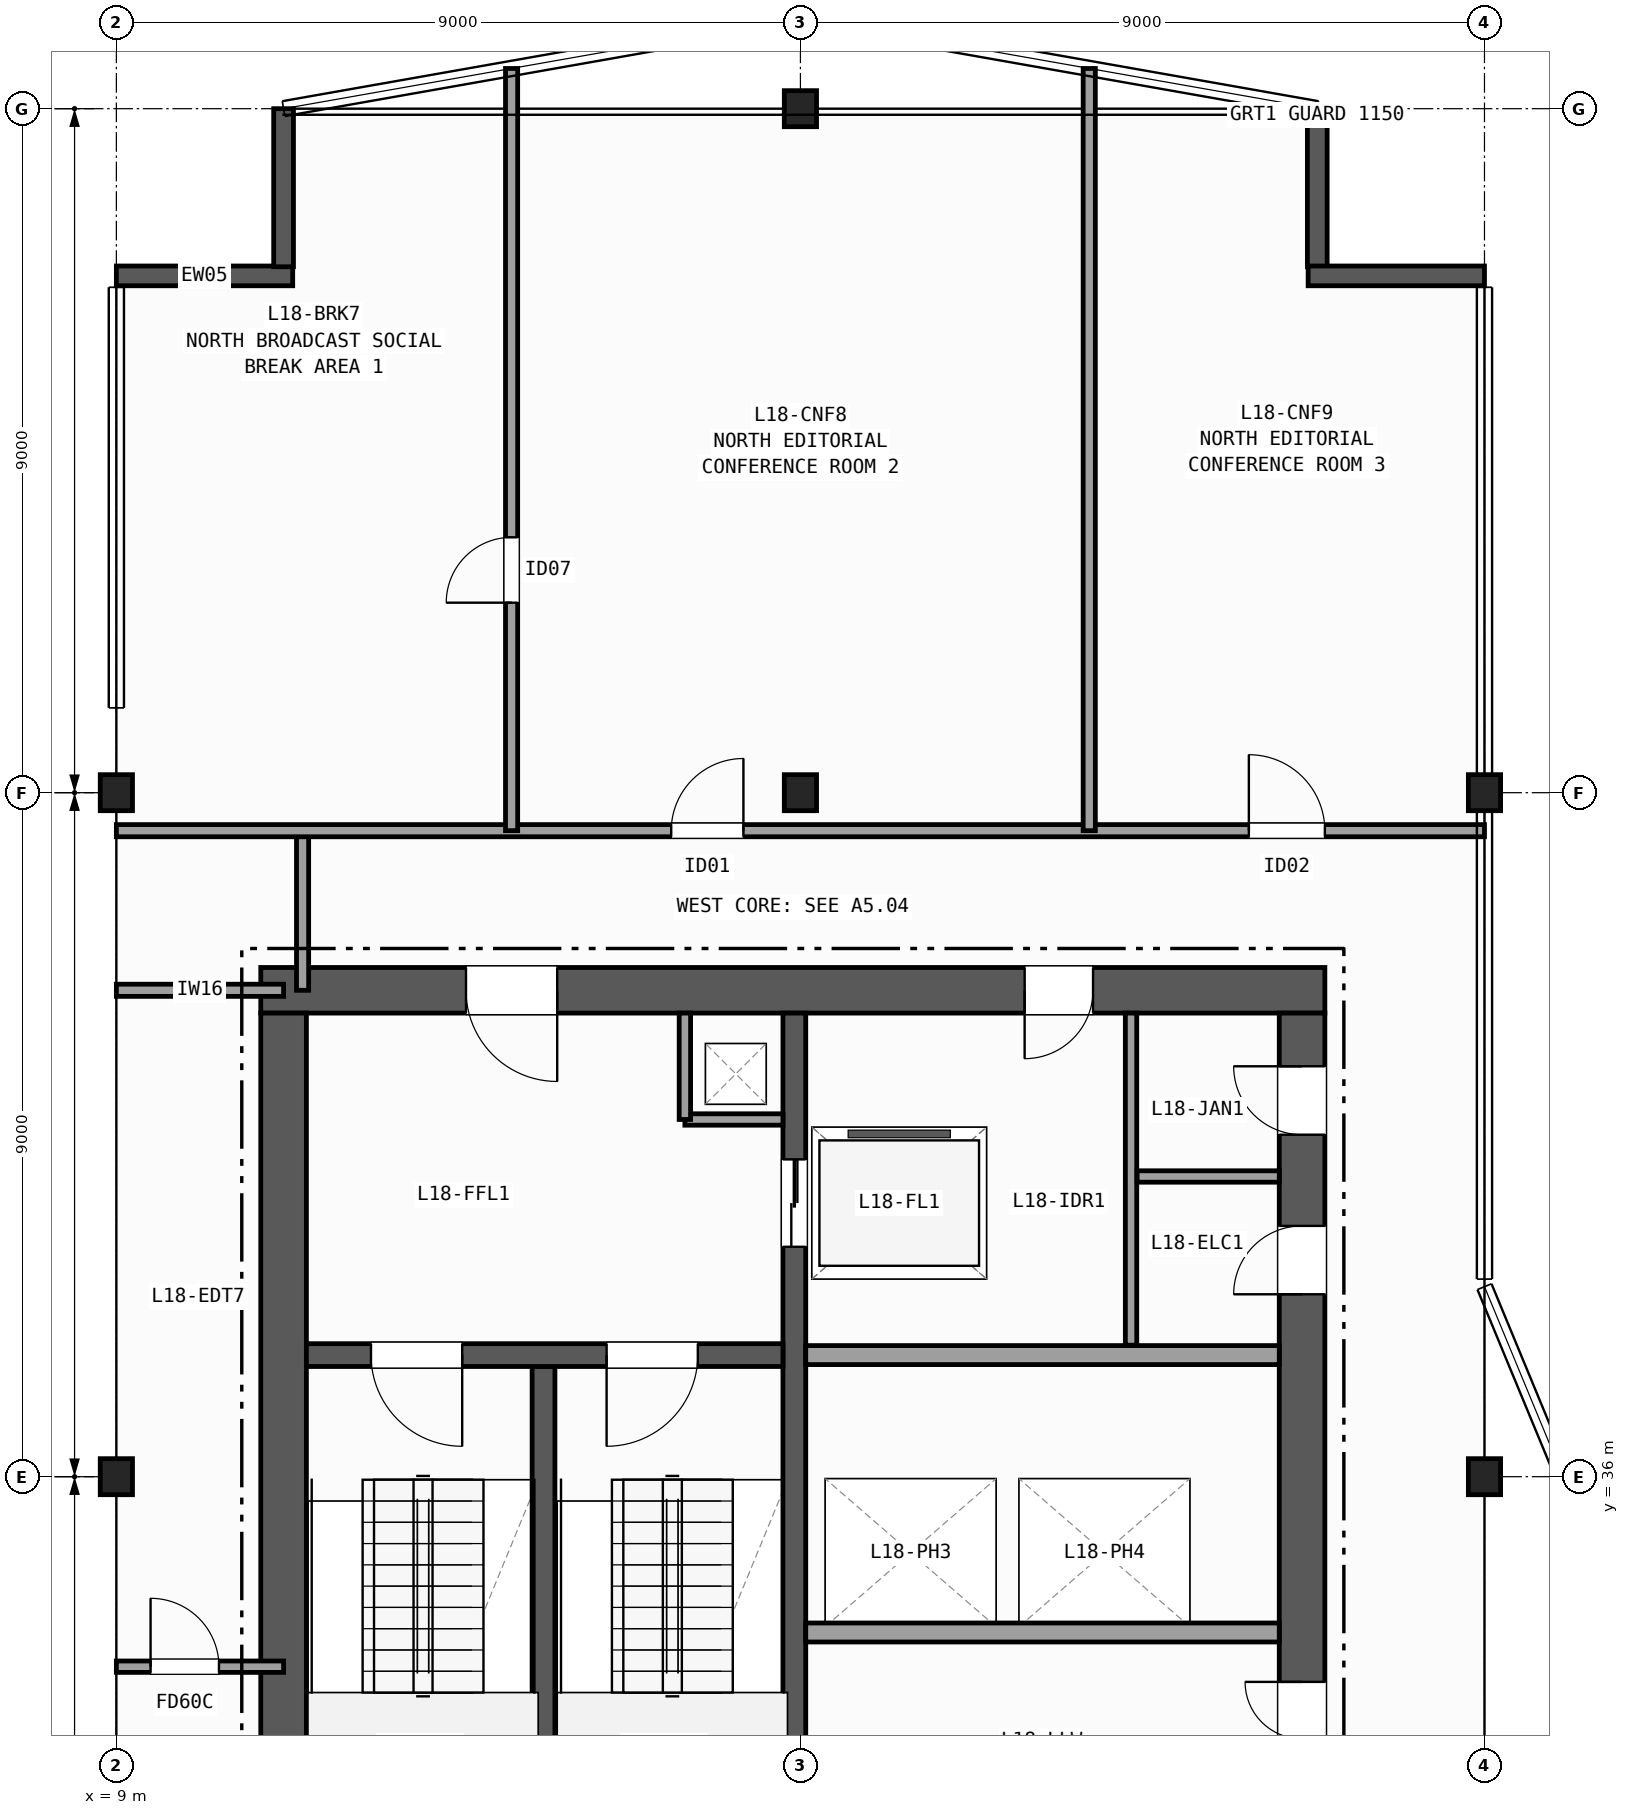
"""IFC4 building model, lengths in metres.
Left out: names, types, materials, properties, quantities, classifications, styles, units other than length and angle.
Written with IfcOpenShell. Run it as: python <this file> out.ifc"""

import sys

from ifc_helpers import new_model, si_unit, direction, frame, frame_2d, origin, origin_2d, place, context, subcontext, project, spatial, rectangle, i_section, extrude, element, fill, save


model = new_model("IFC4")
c1 = context("Model", 3, precision=1e-05, world=origin(), true_north=direction((0.0, 1.0)))
c2 = subcontext(c1, "Body", "Model", "MODEL_VIEW")
j1 = project(units=[si_unit("LENGTHUNIT", "METRE"), si_unit("PLANEANGLEUNIT", "RADIAN")], contexts=[c1])
p1 = place(None, origin())
s1 = spatial("IfcSite", under=j1, at=p1, CompositionType="ELEMENT")
p2 = place(p1, origin())
s2 = spatial("IfcBuilding", under=s1, at=p2, CompositionType="ELEMENT")
p3 = place(p2, frame((0.0, 0.0, 76.7)))
s3 = spatial("IfcBuildingStorey", under=s2, at=p3, CompositionType="ELEMENT", Elevation=76.7)
for number, where, z_axis, x_axis in (
    (1, (9.0, 36.0, 0.0), (0.0, 0.0, 1.0), (1.0, 0.0, 0.0)),
    (2, (9.0, 45.0, 0.0), (0.0, 0.0, 1.0), (1.0, 0.0, 0.0)),
    (3, (18.0, 45.0, 0.0), (0.0, 0.0, 1.0), (1.0, 0.0, 0.0)),
    (4, (18.0, 54.0, 0.0), (0.0, 0.0, 1.0), (1.0, 0.0, 0.0)),
    (5, (27.0, 36.0, 0.0), (0.0, 0.0, 1.0), (1.0, 0.0, 0.0)),
    (6, (27.0, 45.0, 0.0), (0.0, 0.0, 1.0), (1.0, 0.0, 0.0)),
):
    element("IfcColumn", number, at=place(p3, frame(where, z_axis=z_axis, x_axis=x_axis)), inside=s3, PredefinedType="COLUMN", context=c2, shape_type="SweptSolid", body=[
        extrude(i_section(OverallWidth=0.424, OverallDepth=0.474, WebThickness=0.048, FlangeThickness=0.077, FilletRadius=0.015, at=origin_2d()), origin(), (0.0, 0.0, 1.0), 3.7),
    ])
p4 = place(p3, frame((9.0, 51.8, 0.0), z_axis=(0.0, 0.0, 1.0), x_axis=(1.0, 0.0, 0.0)))
e7 = element("IfcWall", 7, at=p4, inside=s3, PredefinedType="SOLIDWALL", context=c2, shape_type="SweptSolid", body=[
    extrude(rectangle(XDim=2.32, YDim=0.26, at=frame_2d((1.16, 0.0))), origin(), (0.0, 0.0, 1.0), 3.42),
])
for number, where, z_axis, x_axis in (
    (8, (11.2, 51.92, 0.0), (0.0, 0.0, 1.0), (0.0, 1.0, 0.0)),
    (9, (24.8, 54.0, 0.0), (0.0, 0.0, 1.0), (0.0, -1.0, 0.0)),
):
    element("IfcWall", number, at=place(p3, frame(where, z_axis=z_axis, x_axis=x_axis)), inside=s3, PredefinedType="SOLIDWALL", context=c2, shape_type="SweptSolid", body=[
        extrude(rectangle(XDim=2.08, YDim=0.26, at=frame_2d((1.04, 0.0))), origin(), (0.0, 0.0, 1.0), 3.42),
    ])
p5 = place(p3, frame((24.68, 51.8, 0.0), z_axis=(0.0, 0.0, 1.0), x_axis=(1.0, 0.0, 0.0)))
e10 = element("IfcWall", 10, at=p5, inside=s3, PredefinedType="SOLIDWALL", context=c2, shape_type="SweptSolid", body=[
    extrude(rectangle(XDim=2.32, YDim=0.26, at=frame_2d((1.16, 0.0))), origin(), (0.0, 0.0, 1.0), 3.42),
])
p6 = place(p3, frame((24.9, 42.4, 0.0), z_axis=(0.0, 0.0, 1.0), x_axis=(-1.0, 0.0, 0.0)))
e11 = element("IfcWall", 11, at=p6, inside=s3, PredefinedType="SHEAR", context=c2, shape_type="SweptSolid", body=[
    extrude(rectangle(XDim=14.0, YDim=0.6, at=frame_2d((7.0, 0.0))), origin(), (0.0, 0.0, 1.0), 3.42),
])
p7 = place(p6, frame((10.1, 0.0, 0.0)))
e12 = element("IfcOpeningElement", 12, at=p7, cuts=e11, PredefinedType="OPENING", context=c2, shape_type="SweptSolid", body=[
    extrude(rectangle(XDim=1.2, YDim=2.15, at=frame_2d((0.6, 1.075))), frame((0.0, 0.31, 0.0), z_axis=(0.0, -1.0, 0.0), x_axis=(1.0, 0.0, 0.0)), (0.0, 0.0, 1.0), 0.62),
])
p8 = place(p6, frame((3.05, 0.0, 0.0)))
e13 = element("IfcOpeningElement", 13, at=p8, cuts=e11, PredefinedType="OPENING", context=c2, shape_type="SweptSolid", body=[
    extrude(rectangle(XDim=0.9, YDim=2.1, at=frame_2d((0.45, 1.05))), frame((0.0, 0.31, 0.0), z_axis=(0.0, -1.0, 0.0), x_axis=(1.0, 0.0, 0.0)), (0.0, 0.0, 1.0), 0.62),
])
p9 = place(p3, frame((11.2, 42.1, 0.0), z_axis=(0.0, 0.0, 1.0), x_axis=(0.0, -1.0, 0.0)))
e14 = element("IfcWall", 14, at=p9, inside=s3, PredefinedType="SHEAR", context=c2, shape_type="SweptSolid", body=[
    extrude(rectangle(XDim=13.6, YDim=0.6, at=frame_2d((6.8, 0.0))), origin(), (0.0, 0.0, 1.0), 3.42),
])
p10 = place(p3, frame((24.6, 28.5, 0.0), z_axis=(0.0, 0.0, 1.0), x_axis=(0.0, 1.0, 0.0)))
e15 = element("IfcWall", 15, at=p10, inside=s3, PredefinedType="SHEAR", context=c2, shape_type="SweptSolid", body=[
    extrude(rectangle(XDim=13.6, YDim=0.6, at=frame_2d((6.8, 0.0))), origin(), (0.0, 0.0, 1.0), 3.42),
])
p11 = place(p10, frame((3.3, 0.0, 0.0)))
e16 = element("IfcOpeningElement", 16, at=p11, cuts=e15, PredefinedType="OPENING", context=c2, shape_type="SweptSolid", body=[
    extrude(rectangle(XDim=1.5, YDim=2.2, at=frame_2d((0.75, 1.1))), frame((0.0, 0.31, 0.0), z_axis=(0.0, -1.0, 0.0), x_axis=(1.0, 0.0, 0.0)), (0.0, 0.0, 1.0), 0.62),
])
p12 = place(p10, frame((9.9, 0.0, 0.0)))
e17 = element("IfcOpeningElement", 17, at=p12, cuts=e15, PredefinedType="OPENING", context=c2, shape_type="SweptSolid", body=[
    extrude(rectangle(XDim=0.9, YDim=2.1, at=frame_2d((0.45, 1.05))), frame((0.0, 0.31, 0.0), z_axis=(0.0, -1.0, 0.0), x_axis=(1.0, 0.0, 0.0)), (0.0, 0.0, 1.0), 0.62),
])
p13 = place(p10, frame((12.0, 0.0, 0.0)))
e18 = element("IfcOpeningElement", 18, at=p13, cuts=e15, PredefinedType="OPENING", context=c2, shape_type="SweptSolid", body=[
    extrude(rectangle(XDim=0.9, YDim=2.1, at=frame_2d((0.45, 1.05))), frame((0.0, 0.31, 0.0), z_axis=(0.0, -1.0, 0.0), x_axis=(1.0, 0.0, 0.0)), (0.0, 0.0, 1.0), 0.62),
])
p14 = place(p3, frame((14.62, 28.5, 0.0), z_axis=(0.0, 0.0, 1.0), x_axis=(0.0, 1.0, 0.0)))
e19 = element("IfcWall", 19, at=p14, inside=s3, PredefinedType="SHEAR", context=c2, shape_type="SweptSolid", body=[
    extrude(rectangle(XDim=8.95, YDim=0.3, at=frame_2d((4.475, 0.0))), origin(), (0.0, 0.0, 1.0), 3.42),
])
p15 = place(p3, frame((17.92, 42.1, 0.0), z_axis=(0.0, 0.0, 1.0), x_axis=(0.0, -1.0, 0.0)))
e20 = element("IfcWall", 20, at=p15, inside=s3, PredefinedType="SHEAR", context=c2, shape_type="SweptSolid", body=[
    extrude(rectangle(XDim=13.6, YDim=0.3, at=frame_2d((6.8, 0.0))), origin(), (0.0, 0.0, 1.0), 3.42),
])
p16 = place(p15, frame((1.925, 0.0, 0.0)))
e21 = element("IfcOpeningElement", 21, at=p16, cuts=e20, PredefinedType="OPENING", context=c2, shape_type="SweptSolid", body=[
    extrude(rectangle(XDim=1.15, YDim=2.15, at=frame_2d((0.575, 1.075))), frame((0.0, 0.16, 0.0), z_axis=(0.0, -1.0, 0.0), x_axis=(1.0, 0.0, 0.0)), (0.0, 0.0, 1.0), 0.32),
])
p17 = place(p3, frame((17.77, 37.6, 0.0), z_axis=(0.0, 0.0, 1.0), x_axis=(-1.0, 0.0, 0.0)))
e22 = element("IfcWall", 22, at=p17, inside=s3, PredefinedType="SHEAR", context=c2, shape_type="SweptSolid", body=[
    extrude(rectangle(XDim=6.27, YDim=0.3, at=frame_2d((3.135, 0.0))), origin(), (0.0, 0.0, 1.0), 3.42),
])
p18 = place(p17, frame((4.22, 0.0, 0.0)))
e23 = element("IfcOpeningElement", 23, at=p18, cuts=e22, PredefinedType="OPENING", context=c2, shape_type="SweptSolid", body=[
    extrude(rectangle(XDim=1.2, YDim=2.15, at=frame_2d((0.6, 1.075))), frame((0.0, 0.16, 0.0), z_axis=(0.0, -1.0, 0.0), x_axis=(1.0, 0.0, 0.0)), (0.0, 0.0, 1.0), 0.32),
])
p19 = place(p17, frame((1.12, 0.0, 0.0)))
e24 = element("IfcOpeningElement", 24, at=p19, cuts=e22, PredefinedType="OPENING", context=c2, shape_type="SweptSolid", body=[
    extrude(rectangle(XDim=1.2, YDim=2.15, at=frame_2d((0.6, 1.075))), frame((0.0, 0.16, 0.0), z_axis=(0.0, -1.0, 0.0), x_axis=(1.0, 0.0, 0.0)), (0.0, 0.0, 1.0), 0.32),
])
p20 = place(p3, frame((16.48, 40.7, 0.0), z_axis=(0.0, 0.0, 1.0), x_axis=(1.0, 0.0, 0.0)))
e25 = element("IfcWall", 25, at=p20, inside=s3, PredefinedType="PARTITIONING", context=c2, shape_type="SweptSolid", body=[
    extrude(rectangle(XDim=1.29, YDim=0.15, at=frame_2d((0.645, 0.0))), origin(), (0.0, 0.0, 1.0), 3.42),
])
p21 = place(p3, frame((16.48, 40.7, 0.0), z_axis=(0.0, 0.0, 1.0), x_axis=(0.0, 1.0, 0.0)))
e26 = element("IfcWall", 26, at=p21, inside=s3, PredefinedType="PARTITIONING", context=c2, shape_type="SweptSolid", body=[
    extrude(rectangle(XDim=1.4, YDim=0.15, at=frame_2d((0.7, 0.0))), origin(), (0.0, 0.0, 1.0), 3.42),
])
for number, where, z_axis, x_axis in (
    (27, (18.07, 37.6, 0.0), (0.0, 0.0, 1.0), (1.0, 0.0, 0.0)),
    (28, (24.3, 33.95, 0.0), (0.0, 0.0, 1.0), (-1.0, 0.0, 0.0)),
):
    element("IfcWall", number, at=place(p3, frame(where, z_axis=z_axis, x_axis=x_axis)), inside=s3, PredefinedType="PARTITIONING", context=c2, shape_type="SweptSolid", body=[
        extrude(rectangle(XDim=6.23, YDim=0.25, at=frame_2d((3.115, 0.0))), origin(), (0.0, 0.0, 1.0), 3.42),
    ])
p22 = place(p3, frame((22.35, 37.73, 0.0), z_axis=(0.0, 0.0, 1.0), x_axis=(0.0, 1.0, 0.0)))
e29 = element("IfcWall", 29, at=p22, inside=s3, PredefinedType="PARTITIONING", context=c2, shape_type="SweptSolid", body=[
    extrude(rectangle(XDim=4.37, YDim=0.15, at=frame_2d((2.185, 0.0))), origin(), (0.0, 0.0, 1.0), 3.42),
])
p23 = place(p3, frame((22.43, 39.95, 0.0), z_axis=(0.0, 0.0, 1.0), x_axis=(1.0, 0.0, 0.0)))
e30 = element("IfcWall", 30, at=p23, inside=s3, PredefinedType="PARTITIONING", context=c2, shape_type="SweptSolid", body=[
    extrude(rectangle(XDim=1.87, YDim=0.15, at=frame_2d((0.935, 0.0))), origin(), (0.0, 0.0, 1.0), 3.42),
])
p24 = place(p3, frame((9.0, 42.4, 0.0), z_axis=(0.0, 0.0, 1.0), x_axis=(1.0, 0.0, 0.0)))
e31 = element("IfcWall", 31, at=p24, inside=s3, PredefinedType="PARTITIONING", context=c2, shape_type="SweptSolid", body=[
    extrude(rectangle(XDim=2.2, YDim=0.16, at=frame_2d((1.1, 0.0))), origin(), (0.0, 0.0, 1.0), 2.627),
])
p25 = place(p3, frame((11.45, 42.4, 0.0), z_axis=(0.0, 0.0, 1.0), x_axis=(0.0, 1.0, 0.0)))
e32 = element("IfcWall", 32, at=p25, inside=s3, PredefinedType="PARTITIONING", context=c2, shape_type="SweptSolid", body=[
    extrude(rectangle(XDim=2.1, YDim=0.16, at=frame_2d((1.05, 0.0))), origin(), (0.0, 0.0, 1.0), 3.42),
])
p26 = place(p3, frame((9.0, 33.5, 0.0), z_axis=(0.0, 0.0, 1.0), x_axis=(1.0, 0.0, 0.0)))
e33 = element("IfcWall", 33, at=p26, inside=s3, PredefinedType="PARTITIONING", context=c2, shape_type="SweptSolid", body=[
    extrude(rectangle(XDim=2.2, YDim=0.15, at=frame_2d((1.1, 0.0))), origin(), (0.0, 0.0, 1.0), 2.627),
])
p27 = place(p26, frame((0.45, 0.0, 0.0)))
e34 = element("IfcOpeningElement", 34, at=p27, cuts=e33, PredefinedType="OPENING", context=c2, shape_type="SweptSolid", body=[
    extrude(rectangle(XDim=0.9, YDim=2.1, at=frame_2d((0.45, 1.05))), frame((0.0, 0.085, 0.0), z_axis=(0.0, -1.0, 0.0), x_axis=(1.0, 0.0, 0.0)), (0.0, 0.0, 1.0), 0.17),
])
p28 = place(p3, frame((9.0, 44.5, 0.0), z_axis=(0.0, 0.0, 1.0), x_axis=(1.0, 0.0, 0.0)))
e35 = element("IfcWall", 35, at=p28, inside=s3, PredefinedType="PARTITIONING", context=c2, shape_type="SweptSolid", body=[
    extrude(rectangle(XDim=18.0, YDim=0.16, at=frame_2d((9.0, 0.0))), origin(), (0.0, 0.0, 1.0), 2.627),
])
p29 = place(p28, frame((7.3, 0.0, 0.0)))
e36 = element("IfcOpeningElement", 36, at=p29, cuts=e35, PredefinedType="OPENING", context=c2, shape_type="SweptSolid", body=[
    extrude(rectangle(XDim=0.95, YDim=2.1, at=frame_2d((0.475, 1.05))), frame((0.0, 0.09, 0.0), z_axis=(0.0, -1.0, 0.0), x_axis=(1.0, 0.0, 0.0)), (0.0, 0.0, 1.0), 0.18),
])
p30 = place(p28, frame((14.9, 0.0, 0.0)))
e37 = element("IfcOpeningElement", 37, at=p30, cuts=e35, PredefinedType="OPENING", context=c2, shape_type="SweptSolid", body=[
    extrude(rectangle(XDim=1.0, YDim=2.1, at=frame_2d((0.5, 1.05))), frame((0.0, 0.09, 0.0), z_axis=(0.0, -1.0, 0.0), x_axis=(1.0, 0.0, 0.0)), (0.0, 0.0, 1.0), 0.18),
])
p31 = place(p3, frame((14.2, 44.5, 0.0), z_axis=(0.0, 0.0, 1.0), x_axis=(0.0, 1.0, 0.0)))
e38 = element("IfcWall", 38, at=p31, inside=s3, PredefinedType="PARTITIONING", context=c2, shape_type="SweptSolid", body=[
    extrude(rectangle(XDim=10.029, YDim=0.16, at=frame_2d((5.015, 0.0))), origin(), (0.0, 0.0, 1.0), 3.42),
])
p32 = place(p31, frame((3.0, 0.0, 0.0)))
e39 = element("IfcOpeningElement", 39, at=p32, cuts=e38, PredefinedType="OPENING", context=c2, shape_type="SweptSolid", body=[
    extrude(rectangle(XDim=0.86, YDim=2.05, at=frame_2d((0.43, 1.025))), frame((0.0, 0.09, 0.0), z_axis=(0.0, -1.0, 0.0), x_axis=(1.0, 0.0, 0.0)), (0.0, 0.0, 1.0), 0.18),
])
p33 = place(p3, frame((21.8, 44.5, 0.0), z_axis=(0.0, 0.0, 1.0), x_axis=(0.0, 1.0, 0.0)))
e40 = element("IfcWall", 40, at=p33, inside=s3, PredefinedType="PARTITIONING", context=c2, shape_type="SweptSolid", body=[
    extrude(rectangle(XDim=10.029, YDim=0.16, at=frame_2d((5.015, 0.0))), origin(), (0.0, 0.0, 1.0), 3.42),
])
p34 = place(p18, origin())
e41 = element("IfcDoor", 41, at=p34, inside=s3, OperationType="SINGLE_SWING_LEFT", PredefinedType="DOOR", context=c2, shape_type="SweptSolid", body=[
    extrude(rectangle(XDim=1.2, YDim=2.15, at=frame_2d((0.6, 1.075))), frame((0.0, 0.025, 0.0), z_axis=(0.0, -1.0, 0.0), x_axis=(1.0, 0.0, 0.0)), (0.0, 0.0, 1.0), 0.05),
])
fill(e23, e41)
p35 = place(p19, origin())
e42 = element("IfcDoor", 42, at=p35, inside=s3, OperationType="SINGLE_SWING_RIGHT", PredefinedType="DOOR", context=c2, shape_type="SweptSolid", body=[
    extrude(rectangle(XDim=1.2, YDim=2.15, at=frame_2d((0.6, 1.075))), frame((0.0, 0.025, 0.0), z_axis=(0.0, -1.0, 0.0), x_axis=(1.0, 0.0, 0.0)), (0.0, 0.0, 1.0), 0.05),
])
fill(e24, e42)
p36 = place(p11, origin())
e43 = element("IfcDoor", 43, at=p36, inside=s3, OperationType="DOUBLE_DOOR_SINGLE_SWING", PredefinedType="DOOR", context=c2, shape_type="SweptSolid", body=[
    extrude(rectangle(XDim=1.5, YDim=2.2, at=frame_2d((0.75, 1.1))), frame((0.0, 0.025, 0.0), z_axis=(0.0, -1.0, 0.0), x_axis=(1.0, 0.0, 0.0)), (0.0, 0.0, 1.0), 0.05),
])
fill(e16, e43)
p37 = place(p7, origin())
e44 = element("IfcDoor", 44, at=p37, inside=s3, OperationType="SINGLE_SWING_LEFT", PredefinedType="DOOR", context=c2, shape_type="SweptSolid", body=[
    extrude(rectangle(XDim=1.2, YDim=2.15, at=frame_2d((0.6, 1.075))), frame((0.0, 0.025, 0.0), z_axis=(0.0, -1.0, 0.0), x_axis=(1.0, 0.0, 0.0)), (0.0, 0.0, 1.0), 0.05),
])
fill(e12, e44)
p38 = place(p12, origin())
e45 = element("IfcDoor", 45, at=p38, inside=s3, OperationType="SINGLE_SWING_LEFT", PredefinedType="DOOR", context=c2, shape_type="SweptSolid", body=[
    extrude(rectangle(XDim=0.9, YDim=2.1, at=frame_2d((0.45, 1.05))), frame((0.0, 0.025, 0.0), z_axis=(0.0, -1.0, 0.0), x_axis=(1.0, 0.0, 0.0)), (0.0, 0.0, 1.0), 0.05),
])
fill(e17, e45)
p39 = place(p8, origin())
e46 = element("IfcDoor", 46, at=p39, inside=s3, OperationType="SINGLE_SWING_RIGHT", PredefinedType="DOOR", context=c2, shape_type="SweptSolid", body=[
    extrude(rectangle(XDim=0.9, YDim=2.1, at=frame_2d((0.45, 1.05))), frame((0.0, 0.025, 0.0), z_axis=(0.0, -1.0, 0.0), x_axis=(1.0, 0.0, 0.0)), (0.0, 0.0, 1.0), 0.05),
])
fill(e13, e46)
p40 = place(p13, origin())
e47 = element("IfcDoor", 47, at=p40, inside=s3, OperationType="SINGLE_SWING_RIGHT", PredefinedType="DOOR", context=c2, shape_type="SweptSolid", body=[
    extrude(rectangle(XDim=0.9, YDim=2.1, at=frame_2d((0.45, 1.05))), frame((0.0, 0.025, 0.0), z_axis=(0.0, -1.0, 0.0), x_axis=(1.0, 0.0, 0.0)), (0.0, 0.0, 1.0), 0.05),
])
fill(e18, e47)
p41 = place(p16, origin())
e48 = element("IfcDoor", 48, at=p41, inside=s3, OperationType="DOUBLE_DOOR_SLIDING", PredefinedType="DOOR", context=c2, shape_type="SweptSolid", body=[
    extrude(rectangle(XDim=1.15, YDim=2.15, at=frame_2d((0.575, 1.075))), frame((0.0, 0.025, 0.0), z_axis=(0.0, -1.0, 0.0), x_axis=(1.0, 0.0, 0.0)), (0.0, 0.0, 1.0), 0.05),
])
fill(e21, e48)
p42 = place(p27, origin())
e49 = element("IfcDoor", 49, at=p42, inside=s3, OperationType="SINGLE_SWING_LEFT", PredefinedType="DOOR", context=c2, shape_type="SweptSolid", body=[
    extrude(rectangle(XDim=0.9, YDim=2.1, at=frame_2d((0.45, 1.05))), frame((0.0, 0.025, 0.0), z_axis=(0.0, -1.0, 0.0), x_axis=(1.0, 0.0, 0.0)), (0.0, 0.0, 1.0), 0.05),
])
fill(e34, e49)
p43 = place(p32, origin())
e50 = element("IfcDoor", 50, at=p43, inside=s3, OperationType="SINGLE_SWING_LEFT", PredefinedType="DOOR", context=c2, shape_type="SweptSolid", body=[
    extrude(rectangle(XDim=0.86, YDim=2.05, at=frame_2d((0.43, 1.025))), frame((0.0, 0.025, 0.0), z_axis=(0.0, -1.0, 0.0), x_axis=(1.0, 0.0, 0.0)), (0.0, 0.0, 1.0), 0.05),
])
fill(e39, e50)
p44 = place(p29, origin())
e51 = element("IfcDoor", 51, at=p44, inside=s3, OperationType="SINGLE_SWING_RIGHT", PredefinedType="DOOR", context=c2, shape_type="SweptSolid", body=[
    extrude(rectangle(XDim=0.95, YDim=2.1, at=frame_2d((0.475, 1.05))), frame((0.0, 0.025, 0.0), z_axis=(0.0, -1.0, 0.0), x_axis=(1.0, 0.0, 0.0)), (0.0, 0.0, 1.0), 0.05),
])
fill(e36, e51)
p45 = place(p30, origin())
e52 = element("IfcDoor", 52, at=p45, inside=s3, OperationType="SINGLE_SWING_LEFT", PredefinedType="DOOR", context=c2, shape_type="SweptSolid", body=[
    extrude(rectangle(XDim=1.0, YDim=2.1, at=frame_2d((0.5, 1.05))), frame((0.0, 0.025, 0.0), z_axis=(0.0, -1.0, 0.0), x_axis=(1.0, 0.0, 0.0)), (0.0, 0.0, 1.0), 0.05),
])
fill(e37, e52)
save(model, sys.argv[1])
